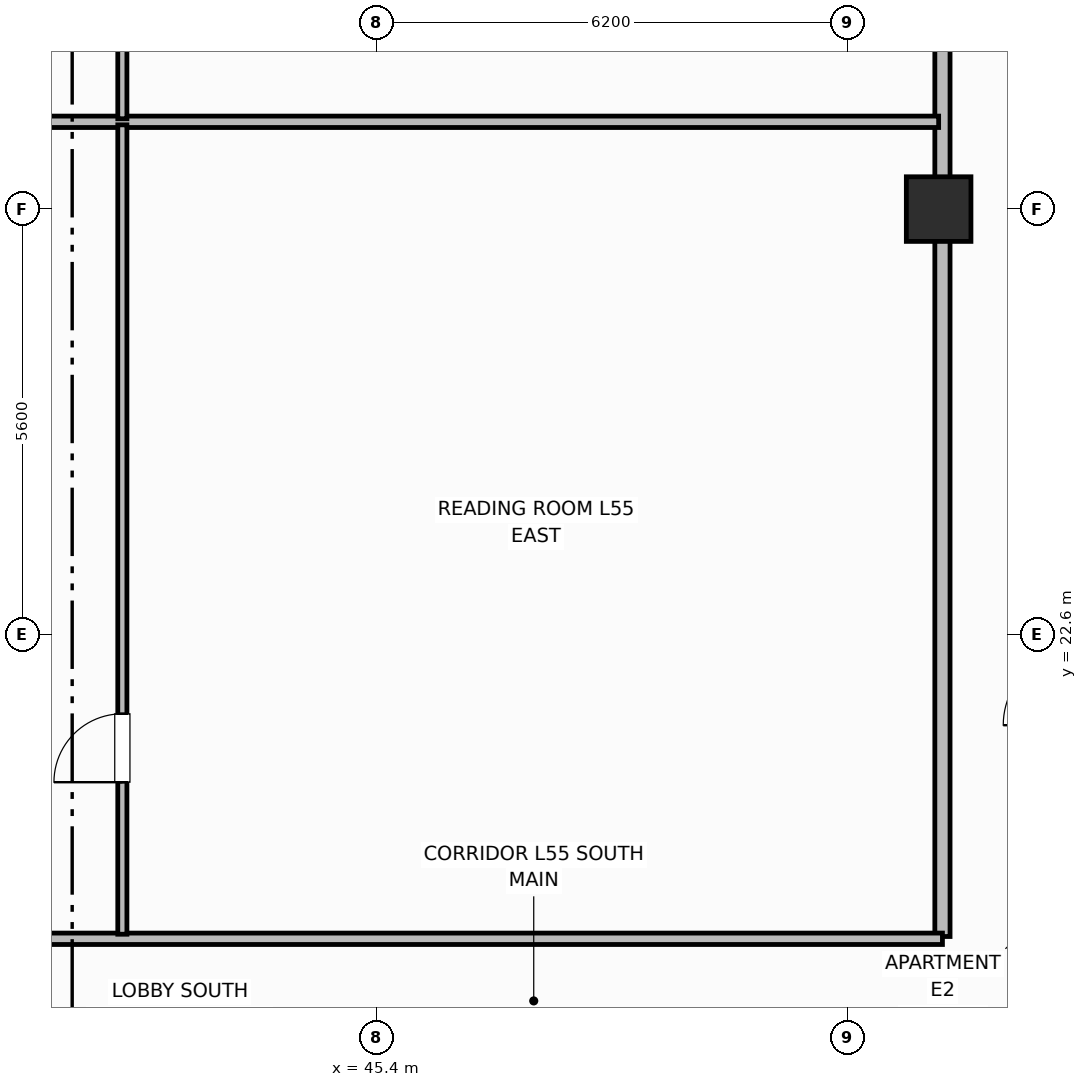
"""IFC4 building model, lengths in metres.
Left out: names, types, materials, properties, quantities, classifications, styles, units other than length and angle.
Written with IfcOpenShell. Run it as: python <this file> out.ifc"""

import sys

from ifc_helpers import new_model, si_unit, direction, frame, frame_2d, origin, origin_2d, place, context, subcontext, project, spatial, rectangle, extrude, element, fill, save


model = new_model("IFC4")
c1 = context("Model", 3, precision=1e-05, world=origin(), true_north=direction((0.0, 1.0)))
c2 = subcontext(c1, "Body", "Model", "MODEL_VIEW")
j1 = project(units=[si_unit("LENGTHUNIT", "METRE"), si_unit("PLANEANGLEUNIT", "RADIAN")], contexts=[c1])
p1 = place(None, origin())
s1 = spatial("IfcSite", under=j1, at=p1, CompositionType="ELEMENT")
p2 = place(p1, origin())
s2 = spatial("IfcBuilding", under=s1, at=p2, CompositionType="ELEMENT")
p3 = place(p2, frame((0.0, 0.0, 222.1)))
s3 = spatial("IfcBuildingStorey", under=s2, at=p3, CompositionType="ELEMENT", Elevation=222.1)
p4 = place(p3, frame((52.8, 28.2, 0.0), z_axis=(0.0, 0.0, 1.0), x_axis=(1.0, 0.0, 0.0)))
e1 = element("IfcColumn", 1, at=p4, inside=s3, PredefinedType="COLUMN", context=c2, shape_type="SweptSolid", body=[
    extrude(rectangle(XDim=0.85, YDim=0.85, at=origin_2d()), origin(), (0.0, 0.0, 1.0), 3.7),
])
p5 = place(p3, frame((52.85, 18.63, 0.0), z_axis=(0.0, 0.0, 1.0), x_axis=(0.0, 1.0, 0.0)))
e2 = element("IfcWall", 2, at=p5, inside=s3, PredefinedType="PARTITIONING", context=c2, shape_type="SweptSolid", body=[
    extrude(rectangle(XDim=19.14, YDim=0.2, at=frame_2d((9.57, 0.0))), origin(), (0.0, 0.0, 1.0), 2.24),
])
p6 = place(p3, frame((31.35, 18.6, 0.0), z_axis=(0.0, 0.0, 1.0), x_axis=(1.0, 0.0, 0.0)))
e3 = element("IfcWall", 3, at=p6, inside=s3, PredefinedType="PARTITIONING", context=c2, shape_type="SweptSolid", body=[
    extrude(rectangle(XDim=21.5, YDim=0.15, at=frame_2d((10.75, 0.0))), origin(), (0.0, 0.0, 1.0), 2.24),
])
p7 = place(p3, frame((31.38, 29.348, 0.0), z_axis=(0.0, 0.0, 1.0), x_axis=(1.0, 0.0, 0.0)))
e4 = element("IfcWall", 4, at=p7, inside=s3, PredefinedType="PARTITIONING", context=c2, shape_type="SweptSolid", body=[
    extrude(rectangle(XDim=21.42, YDim=0.15, at=frame_2d((10.71, 0.0))), origin(), (0.0, 0.0, 1.0), 2.24),
])
p8 = place(p3, frame((42.06, 18.66, 0.0), z_axis=(0.0, 0.0, 1.0), x_axis=(0.0, 1.0, 0.0)))
e5 = element("IfcWall", 5, at=p8, inside=s3, PredefinedType="PARTITIONING", context=c2, shape_type="SweptSolid", body=[
    extrude(rectangle(XDim=10.648, YDim=0.12, at=frame_2d((5.324, 0.0))), origin(), (0.0, 0.0, 1.0), 2.24),
])
p9 = place(p8, frame((2.0, 0.0, 0.0)))
e6 = element("IfcOpeningElement", 6, at=p9, cuts=e5, PredefinedType="OPENING", context=c2, shape_type="SweptSolid", body=[
    extrude(rectangle(XDim=0.9, YDim=2.1, at=frame_2d((0.45, 1.05))), frame((0.0, 0.07, 0.0), z_axis=(0.0, -1.0, 0.0), x_axis=(1.0, 0.0, 0.0)), (0.0, 0.0, 1.0), 0.14),
])
p10 = place(p3, frame((42.06, 29.388, 0.0), z_axis=(0.0, 0.0, 1.0), x_axis=(0.0, 1.0, 0.0)))
e7 = element("IfcWall", 7, at=p10, inside=s3, PredefinedType="PARTITIONING", context=c2, shape_type="SweptSolid", body=[
    extrude(rectangle(XDim=8.352, YDim=0.12, at=frame_2d((4.176, 0.0))), origin(), (0.0, 0.0, 1.0), 2.24),
])
p11 = place(p10, frame((2.0, 0.0, 0.0)))
e8 = element("IfcOpeningElement", 8, at=p11, cuts=e7, PredefinedType="OPENING", context=c2, shape_type="SweptSolid", body=[
    extrude(rectangle(XDim=0.9, YDim=2.1, at=frame_2d((0.45, 1.05))), frame((0.0, 0.07, 0.0), z_axis=(0.0, -1.0, 0.0), x_axis=(1.0, 0.0, 0.0)), (0.0, 0.0, 1.0), 0.14),
])
p12 = place(p9, origin())
e9 = element("IfcDoor", 9, at=p12, inside=s3, OperationType="SINGLE_SWING_LEFT", PredefinedType="DOOR", context=c2, shape_type="SweptSolid", body=[
    extrude(rectangle(XDim=0.9, YDim=2.1, at=frame_2d((0.45, 1.05))), frame((0.0, 0.025, 0.0), z_axis=(0.0, -1.0, 0.0), x_axis=(1.0, 0.0, 0.0)), (0.0, 0.0, 1.0), 0.05),
])
fill(e6, e9)
save(model, sys.argv[1])
